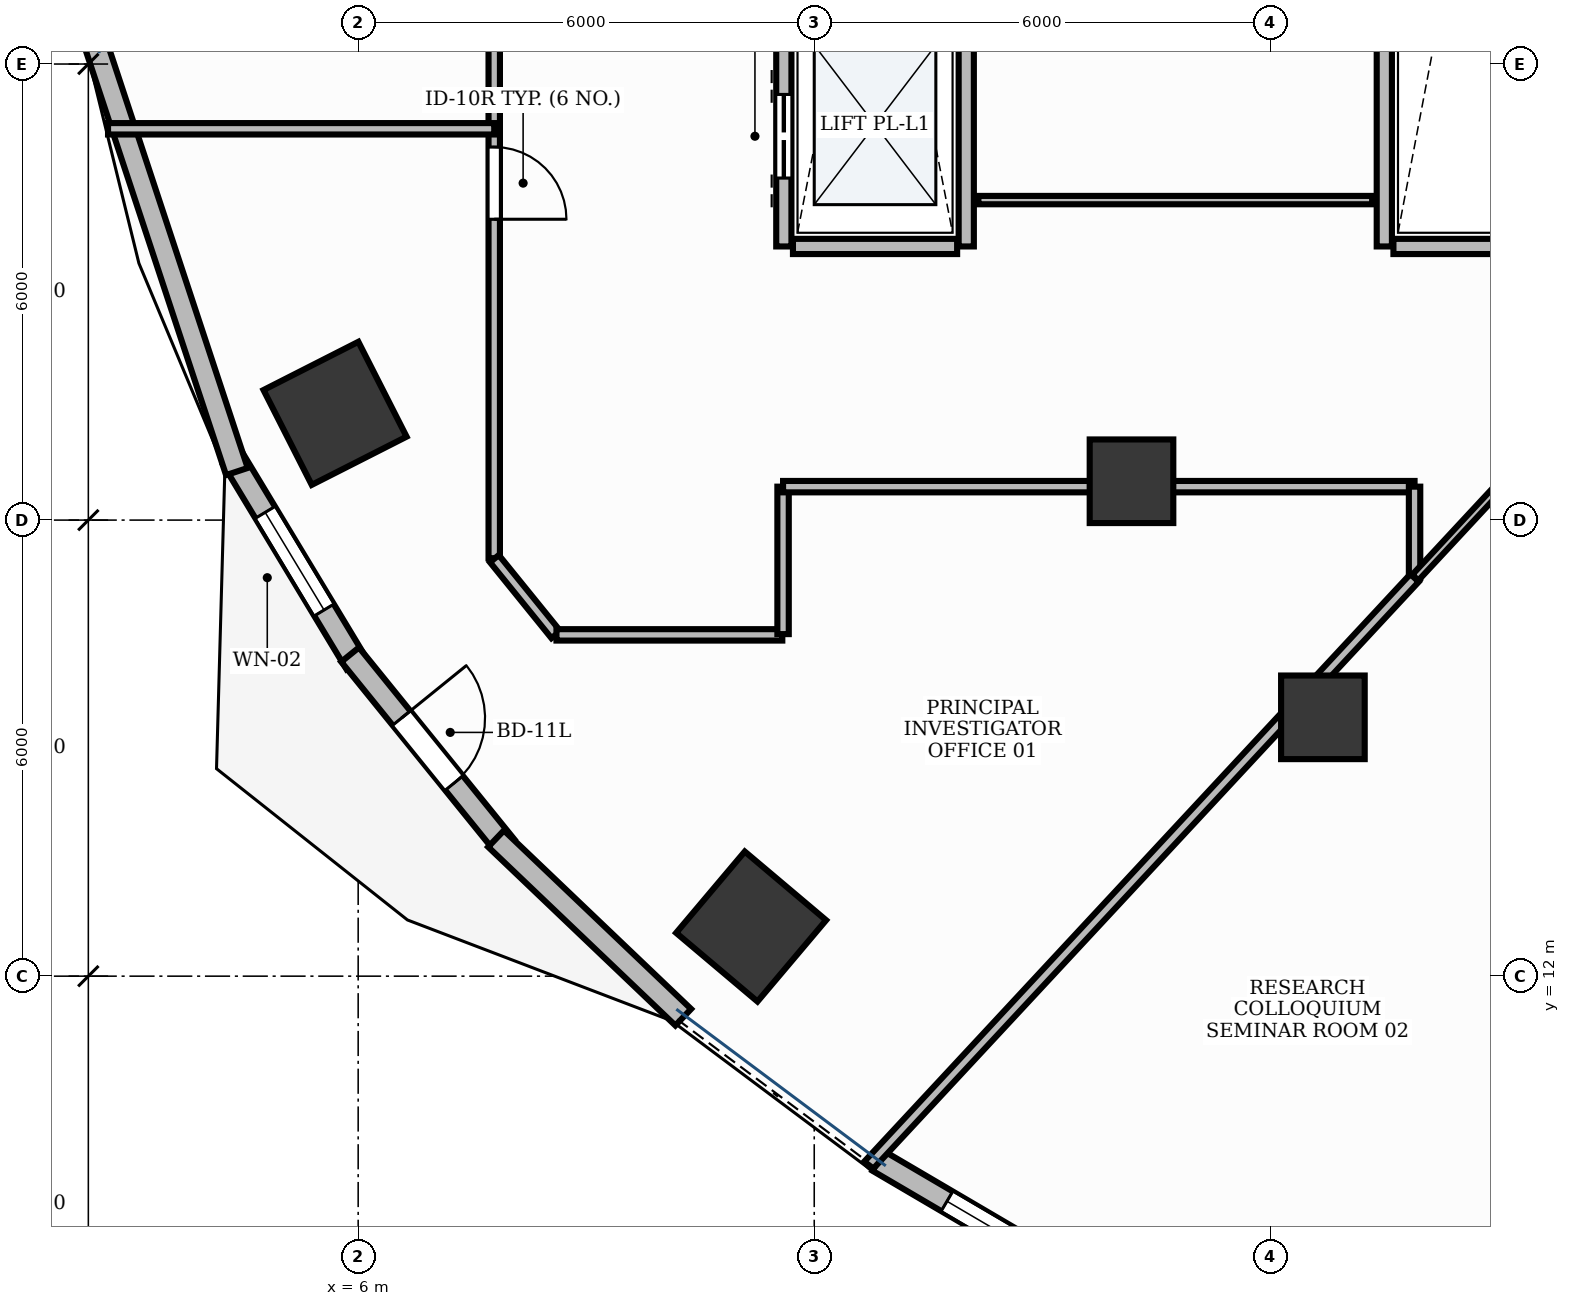
"""IFC4 building model, lengths in metres.
Left out: names, types, materials, properties, quantities, classifications, styles, units other than length and angle.
Written with IfcOpenShell. Run it as: python <this file> out.ifc"""

import sys

from ifc_helpers import new_model, si_unit, direction, frame, frame_2d, origin, origin_2d, place, context, subcontext, project, spatial, rectangle, extrude, element, fill, save


model = new_model("IFC4")
c1 = context("Model", 3, precision=1e-05, world=origin(), true_north=direction((0.0, 1.0)))
c2 = subcontext(c1, "Body", "Model", "MODEL_VIEW")
j1 = project(units=[si_unit("LENGTHUNIT", "METRE"), si_unit("PLANEANGLEUNIT", "RADIAN")], contexts=[c1])
p1 = place(None, origin())
s1 = spatial("IfcSite", under=j1, at=p1, CompositionType="ELEMENT")
p2 = place(p1, origin())
s2 = spatial("IfcBuilding", under=s1, at=p2, CompositionType="ELEMENT")
p3 = place(p2, frame((0.0, 0.0, 80.4)))
s3 = spatial("IfcBuildingStorey", under=s2, at=p3, CompositionType="ELEMENT", Elevation=80.4)
p4 = place(p3, frame((5.696, 19.404, -0.0), z_axis=(0.0, 0.0, 1.0), x_axis=(-0.453057191132, 0.891481453292, 0.0)))
e1 = element("IfcColumn", 1, at=p4, inside=s3, PredefinedType="COLUMN", context=c2, shape_type="SweptSolid", body=[
    extrude(rectangle(XDim=1.4, YDim=1.4, at=origin_2d()), origin(), (0.0, 0.0, 1.0), 3.881),
])
p5 = place(p3, frame((16.174, 18.511, -0.0), z_axis=(0.0, 0.0, 1.0), x_axis=(1.0, 0.0, 0.0)))
e2 = element("IfcColumn", 2, at=p5, inside=s3, PredefinedType="COLUMN", context=c2, shape_type="SweptSolid", body=[
    extrude(rectangle(XDim=1.1, YDim=1.1, at=origin_2d()), origin(), (0.0, 0.0, 1.0), 3.881),
])
p6 = place(p3, frame((11.17, 12.653, -0.0), z_axis=(0.0, 0.0, 1.0), x_axis=(-0.764246456939, 0.644924300253, 0.0)))
e3 = element("IfcColumn", 3, at=p6, inside=s3, PredefinedType="COLUMN", context=c2, shape_type="SweptSolid", body=[
    extrude(rectangle(XDim=1.4, YDim=1.4, at=origin_2d()), origin(), (0.0, 0.0, 1.0), 3.881),
])
p7 = place(p3, frame((18.692, 15.405, -0.0), z_axis=(0.0, 0.0, 1.0), x_axis=(1.0, 0.0, 0.0)))
e4 = element("IfcColumn", 4, at=p7, inside=s3, PredefinedType="COLUMN", context=c2, shape_type="SweptSolid", body=[
    extrude(rectangle(XDim=1.1, YDim=1.1, at=origin_2d()), origin(), (0.0, 0.0, 1.0), 3.881),
])
p8 = place(p3, frame((4.352, 18.805, 0.0), z_axis=(0.0, 0.0, 1.0), x_axis=(0.516447962267, -0.856318575222, 0.0)))
e5 = element("IfcWall", 5, at=p8, inside=s3, PredefinedType="STANDARD", context=c2, shape_type="SweptSolid", body=[
    extrude(rectangle(XDim=3.143, YDim=0.3, at=frame_2d((1.571, 0.0))), origin(), (0.0, 0.0, 1.0), 3.88),
])
p9 = place(p8, frame((0.821, 0.0, 0.95)))
e6 = element("IfcOpeningElement", 6, at=p9, cuts=e5, PredefinedType="OPENING", context=c2, shape_type="SweptSolid", body=[
    extrude(rectangle(XDim=1.5, YDim=1.8, at=frame_2d((0.75, 0.9))), frame((0.0, 0.165, 0.0), z_axis=(0.0, -1.0, 0.0), x_axis=(1.0, 0.0, 0.0)), (0.0, 0.0, 1.0), 0.33),
])
p10 = place(p3, frame((5.894, 16.23, 0.0), z_axis=(0.0, 0.0, 1.0), x_axis=(0.629295540187, -0.777166084631, 0.0)))
e7 = element("IfcWall", 7, at=p10, inside=s3, PredefinedType="STANDARD", context=c2, shape_type="SweptSolid", body=[
    extrude(rectangle(XDim=3.248, YDim=0.3, at=frame_2d((1.624, 0.0))), origin(), (0.0, 0.0, 1.0), 3.88),
])
p11 = place(p10, frame((1.074, 0.0, 0.0)))
e8 = element("IfcOpeningElement", 8, at=p11, cuts=e7, PredefinedType="OPENING", context=c2, shape_type="SweptSolid", body=[
    extrude(rectangle(XDim=1.1, YDim=2.15, at=frame_2d((0.55, 1.075))), frame((0.0, 0.165, 0.0), z_axis=(0.0, -1.0, 0.0), x_axis=(1.0, 0.0, 0.0)), (0.0, 0.0, 1.0), 0.33),
])
p12 = place(p3, frame((12.843, 9.569, 0.0), z_axis=(0.0, 0.0, 1.0), x_axis=(0.862473134325, -0.506102847817, 0.0)))
e9 = element("IfcWall", 9, at=p12, inside=s3, PredefinedType="STANDARD", context=c2, shape_type="SweptSolid", body=[
    extrude(rectangle(XDim=3.595, YDim=0.3, at=frame_2d((1.798, 0.0))), origin(), (0.0, 0.0, 1.0), 3.88),
])
p13 = place(p12, frame((1.048, 0.0, 0.95)))
e10 = element("IfcOpeningElement", 10, at=p13, cuts=e9, PredefinedType="OPENING", context=c2, shape_type="SweptSolid", body=[
    extrude(rectangle(XDim=1.5, YDim=1.8, at=frame_2d((0.75, 0.9))), frame((0.0, 0.165, 0.0), z_axis=(0.0, -1.0, 0.0), x_axis=(1.0, 0.0, 0.0)), (0.0, 0.0, 1.0), 0.33),
])
p14 = place(p3, frame((2.537, 24.289, 0.0), z_axis=(0.0, 0.0, 1.0), x_axis=(0.31372816724, -0.949512841978, 0.0)))
e11 = element("IfcWall", 11, at=p14, inside=s3, PredefinedType="STANDARD", context=c2, shape_type="SweptSolid", body=[
    extrude(rectangle(XDim=5.951, YDim=0.3, at=frame_2d((2.976, 0.0))), origin(), (0.0, 0.0, 1.0), 3.88),
])
p15 = place(p3, frame((7.814, 13.808, 0.0), z_axis=(0.0, 0.0, 1.0), x_axis=(0.72369587847, -0.69011902994, 0.0)))
e12 = element("IfcWall", 12, at=p15, inside=s3, PredefinedType="STANDARD", context=c2, shape_type="SweptSolid", body=[
    extrude(rectangle(XDim=3.403, YDim=0.3, at=frame_2d((1.701, 0.0))), origin(), (0.0, 0.0, 1.0), 3.88),
])
p16 = place(p3, frame((11.6, 21.6, 0.0), z_axis=(0.0, 0.0, 1.0), x_axis=(0.0, 1.0, 0.0)))
e13 = element("IfcWall", 13, at=p16, inside=s3, PredefinedType="PARTITIONING", context=c2, shape_type="SweptSolid", body=[
    extrude(rectangle(XDim=10.8, YDim=0.2, at=frame_2d((5.4, 0.0))), origin(), (0.0, 0.0, 1.0), 2.22),
])
p17 = place(p16, frame((0.9, 0.0, 0.0)))
e14 = element("IfcOpeningElement", 14, at=p17, cuts=e13, PredefinedType="OPENING", context=c2, shape_type="SweptSolid", body=[
    extrude(rectangle(XDim=1.1, YDim=2.2, at=frame_2d((0.55, 1.1))), frame((0.0, 0.115, 0.0), z_axis=(0.0, -1.0, 0.0), x_axis=(1.0, 0.0, 0.0)), (0.0, 0.0, 1.0), 0.23),
])
p18 = place(p16, frame((3.6, 0.0, 0.0)))
e15 = element("IfcOpeningElement", 15, at=p18, cuts=e13, PredefinedType="OPENING", context=c2, shape_type="SweptSolid", body=[
    extrude(rectangle(XDim=1.1, YDim=2.2, at=frame_2d((0.55, 1.1))), frame((0.0, 0.115, 0.0), z_axis=(0.0, -1.0, 0.0), x_axis=(1.0, 0.0, 0.0)), (0.0, 0.0, 1.0), 0.23),
])
p19 = place(p16, frame((6.3, 0.0, 0.0)))
e16 = element("IfcOpeningElement", 16, at=p19, cuts=e13, PredefinedType="OPENING", context=c2, shape_type="SweptSolid", body=[
    extrude(rectangle(XDim=1.1, YDim=2.2, at=frame_2d((0.55, 1.1))), frame((0.0, 0.115, 0.0), z_axis=(0.0, -1.0, 0.0), x_axis=(1.0, 0.0, 0.0)), (0.0, 0.0, 1.0), 0.23),
])
p20 = place(p16, frame((9.0, 0.0, 0.0)))
e17 = element("IfcOpeningElement", 17, at=p20, cuts=e13, PredefinedType="OPENING", context=c2, shape_type="SweptSolid", body=[
    extrude(rectangle(XDim=1.1, YDim=2.2, at=frame_2d((0.55, 1.1))), frame((0.0, 0.115, 0.0), z_axis=(0.0, -1.0, 0.0), x_axis=(1.0, 0.0, 0.0)), (0.0, 0.0, 1.0), 0.23),
])
p21 = place(p3, frame((14.0, 21.6, 0.0), z_axis=(0.0, 0.0, 1.0), x_axis=(0.0, 1.0, 0.0)))
e18 = element("IfcWall", 18, at=p21, inside=s3, PredefinedType="PARTITIONING", context=c2, shape_type="SweptSolid", body=[
    extrude(rectangle(XDim=10.8, YDim=0.2, at=frame_2d((5.4, 0.0))), origin(), (0.0, 0.0, 1.0), 2.22),
])
p22 = place(p3, frame((11.72, 21.6, 0.0), z_axis=(0.0, 0.0, 1.0), x_axis=(1.0, 0.0, 0.0)))
e19 = element("IfcWall", 19, at=p22, inside=s3, PredefinedType="PARTITIONING", context=c2, shape_type="SweptSolid", body=[
    extrude(rectangle(XDim=2.16, YDim=0.2, at=frame_2d((1.08, 0.0))), origin(), (0.0, 0.0, 1.0), 2.22),
])
p23 = place(p3, frame((19.5, 21.6, 0.0), z_axis=(0.0, 0.0, 1.0), x_axis=(0.0, 1.0, 0.0)))
e20 = element("IfcWall", 20, at=p23, inside=s3, PredefinedType="PARTITIONING", context=c2, shape_type="SweptSolid", body=[
    extrude(rectangle(XDim=10.8, YDim=0.2, at=frame_2d((5.4, 0.0))), origin(), (0.0, 0.0, 1.0), 2.22),
])
p24 = place(p3, frame((19.62, 21.6, 0.0), z_axis=(0.0, 0.0, 1.0), x_axis=(1.0, 0.0, 0.0)))
e21 = element("IfcWall", 21, at=p24, inside=s3, PredefinedType="PARTITIONING", context=c2, shape_type="SweptSolid", body=[
    extrude(rectangle(XDim=2.11, YDim=0.2, at=frame_2d((1.055, 0.0))), origin(), (0.0, 0.0, 1.0), 2.22),
])
p25 = place(p3, frame((7.79, 23.148, 0.0), z_axis=(0.0, 0.0, 1.0), x_axis=(0.0, -1.0, 0.0)))
e22 = element("IfcWall", 22, at=p25, inside=s3, PredefinedType="PARTITIONING", context=c2, shape_type="SweptSolid", body=[
    extrude(rectangle(XDim=5.649, YDim=0.15, at=frame_2d((2.825, 0.0))), origin(), (0.0, 0.0, 1.0), 2.22),
])
p26 = place(p25, frame((0.24, 0.0, 0.0)))
e23 = element("IfcOpeningElement", 23, at=p26, cuts=e22, PredefinedType="OPENING", context=c2, shape_type="SweptSolid", body=[
    extrude(rectangle(XDim=0.95, YDim=2.15, at=frame_2d((0.475, 1.075))), frame((0.0, 0.09, 0.0), z_axis=(0.0, -1.0, 0.0), x_axis=(1.0, 0.0, 0.0)), (0.0, 0.0, 1.0), 0.18),
])
p27 = place(p3, frame((7.79, 36.501, 0.0), z_axis=(0.0, 0.0, 1.0), x_axis=(0.0, -1.0, 0.0)))
e24 = element("IfcWall", 24, at=p27, inside=s3, PredefinedType="PARTITIONING", context=c2, shape_type="SweptSolid", body=[
    extrude(rectangle(XDim=13.343, YDim=0.15, at=frame_2d((6.672, 0.0))), origin(), (0.0, 0.0, 1.0), 2.22),
])
p28 = place(p27, frame((5.079, 0.0, 0.0)))
e25 = element("IfcOpeningElement", 25, at=p28, cuts=e24, PredefinedType="OPENING", context=c2, shape_type="SweptSolid", body=[
    extrude(rectangle(XDim=0.95, YDim=2.15, at=frame_2d((0.475, 1.075))), frame((0.0, 0.09, 0.0), z_axis=(0.0, -1.0, 0.0), x_axis=(1.0, 0.0, 0.0)), (0.0, 0.0, 1.0), 0.18),
])
p29 = place(p3, frame((2.709, 23.148, 0.0), z_axis=(0.0, 0.0, 1.0), x_axis=(1.0, 0.0, 0.0)))
e26 = element("IfcWall", 26, at=p29, inside=s3, PredefinedType="PARTITIONING", context=c2, shape_type="SweptSolid", body=[
    extrude(rectangle(XDim=5.081, YDim=0.15, at=frame_2d((2.541, 0.0))), origin(), (0.0, 0.0, 1.0), 2.22),
])
p30 = place(p3, frame((7.792, 17.492, 0.0), z_axis=(0.0, 0.0, 1.0), x_axis=(0.629225554682, -0.777222748854, 0.0)))
e27 = element("IfcWall", 27, at=p30, inside=s3, PredefinedType="PARTITIONING", context=c2, shape_type="SweptSolid", body=[
    extrude(rectangle(XDim=1.285, YDim=0.15, at=frame_2d((0.643, 0.0))), origin(), (0.0, 0.0, 1.0), 2.22),
])
p31 = place(p3, frame((8.609, 16.49, 0.0), z_axis=(0.0, 0.0, 1.0), x_axis=(1.0, 0.0, 0.0)))
e28 = element("IfcWall", 28, at=p31, inside=s3, PredefinedType="PARTITIONING", context=c2, shape_type="SweptSolid", body=[
    extrude(rectangle(XDim=2.971, YDim=0.15, at=frame_2d((1.486, 0.0))), origin(), (0.0, 0.0, 1.0), 2.22),
])
p32 = place(p3, frame((11.59, 16.5, 0.0), z_axis=(0.0, 0.0, 1.0), x_axis=(0.0, 1.0, 0.0)))
e29 = element("IfcWall", 29, at=p32, inside=s3, PredefinedType="PARTITIONING", context=c2, shape_type="SweptSolid", body=[
    extrude(rectangle(XDim=1.94, YDim=0.15, at=frame_2d((0.97, 0.0))), origin(), (0.0, 0.0, 1.0), 2.22),
])
p33 = place(p3, frame((11.59, 18.44, 0.0), z_axis=(0.0, 0.0, 1.0), x_axis=(1.0, 0.0, 0.0)))
e30 = element("IfcWall", 30, at=p33, inside=s3, PredefinedType="PARTITIONING", context=c2, shape_type="SweptSolid", body=[
    extrude(rectangle(XDim=8.308, YDim=0.15, at=frame_2d((4.154, 0.0))), origin(), (0.0, 0.0, 1.0), 2.22),
])
p34 = place(p3, frame((19.898, 18.44, 0.0), z_axis=(0.0, 0.0, 1.0), x_axis=(0.0, -1.0, 0.0)))
e31 = element("IfcWall", 31, at=p34, inside=s3, PredefinedType="PARTITIONING", context=c2, shape_type="SweptSolid", body=[
    extrude(rectangle(XDim=1.201, YDim=0.15, at=frame_2d((0.6, 0.0))), origin(), (0.0, 0.0, 1.0), 2.22),
])
p35 = place(p3, frame((19.898, 17.239, 0.0), z_axis=(0.0, 0.0, 1.0), x_axis=(-0.680819073157, -0.732451629547, 0.0)))
e32 = element("IfcWall", 32, at=p35, inside=s3, PredefinedType="PARTITIONING", context=c2, shape_type="SweptSolid", body=[
    extrude(rectangle(XDim=10.559, YDim=0.15, at=frame_2d((5.279, 0.0))), origin(), (0.0, 0.0, 1.0), 2.22),
])
p36 = place(p3, frame((25.597, 18.44, 0.0), z_axis=(0.0, 0.0, 1.0), x_axis=(-0.366756051999, -0.930317149322, 0.0)))
e33 = element("IfcWall", 33, at=p36, inside=s3, PredefinedType="MOVABLE", context=c2, shape_type="SweptSolid", body=[
    extrude(rectangle(XDim=13.719, YDim=0.11, at=frame_2d((6.859, 0.0))), origin(), (0.0, 0.0, 1.0), 2.22),
])
p37 = place(p3, frame((19.908, 17.244, 0.0), z_axis=(0.0, 0.0, 1.0), x_axis=(0.680846676947, 0.732425970655, 0.0)))
e34 = element("IfcWall", 34, at=p37, inside=s3, PredefinedType="MOVABLE", context=c2, shape_type="SweptSolid", body=[
    extrude(rectangle(XDim=1.633, YDim=0.11, at=frame_2d((0.816, 0.0))), origin(), (0.0, 0.0, 1.0), 2.22),
])
p38 = place(p3, frame((19.34, 22.21, 0.0), z_axis=(0.0, 0.0, 1.0), x_axis=(-1.0, 0.0, 0.0)))
e35 = element("IfcWall", 35, at=p38, inside=s3, PredefinedType="MOVABLE", context=c2, shape_type="SweptSolid", body=[
    extrude(rectangle(XDim=5.18, YDim=0.11, at=frame_2d((2.59, 0.0))), origin(), (0.0, 0.0, 1.0), 2.22),
])
p39 = place(p9, origin())
e36 = element("IfcWindow", 36, at=p39, inside=s3, PartitioningType="DOUBLE_PANEL_VERTICAL", PredefinedType="WINDOW", context=c2, shape_type="SweptSolid", body=[
    extrude(rectangle(XDim=1.5, YDim=1.8, at=frame_2d((0.75, 0.9))), frame((0.0, 0.03, 0.0), z_axis=(0.0, -1.0, 0.0), x_axis=(1.0, 0.0, 0.0)), (0.0, 0.0, 1.0), 0.06),
])
fill(e6, e36)
p40 = place(p11, origin())
e37 = element("IfcDoor", 37, at=p40, inside=s3, OperationType="SINGLE_SWING_LEFT", PredefinedType="DOOR", context=c2, shape_type="SweptSolid", body=[
    extrude(rectangle(XDim=1.1, YDim=2.15, at=frame_2d((0.55, 1.075))), frame((0.0, 0.025, 0.0), z_axis=(0.0, -1.0, 0.0), x_axis=(1.0, 0.0, 0.0)), (0.0, 0.0, 1.0), 0.05),
])
fill(e8, e37)
p41 = place(p13, origin())
e38 = element("IfcWindow", 38, at=p41, inside=s3, PartitioningType="DOUBLE_PANEL_VERTICAL", PredefinedType="WINDOW", context=c2, shape_type="SweptSolid", body=[
    extrude(rectangle(XDim=1.5, YDim=1.8, at=frame_2d((0.75, 0.9))), frame((0.0, 0.03, 0.0), z_axis=(0.0, -1.0, 0.0), x_axis=(1.0, 0.0, 0.0)), (0.0, 0.0, 1.0), 0.06),
])
fill(e10, e38)
p42 = place(p17, origin())
e39 = element("IfcDoor", 39, at=p42, inside=s3, OperationType="DOUBLE_DOOR_SLIDING", PredefinedType="DOOR", context=c2, shape_type="SweptSolid", body=[
    extrude(rectangle(XDim=1.1, YDim=2.2, at=frame_2d((0.55, 1.1))), frame((0.0, 0.025, 0.0), z_axis=(0.0, -1.0, 0.0), x_axis=(1.0, 0.0, 0.0)), (0.0, 0.0, 1.0), 0.05),
])
fill(e14, e39)
p43 = place(p26, origin())
e40 = element("IfcDoor", 40, at=p43, inside=s3, OperationType="SINGLE_SWING_RIGHT", PredefinedType="DOOR", context=c2, shape_type="SweptSolid", body=[
    extrude(rectangle(XDim=0.95, YDim=2.15, at=frame_2d((0.475, 1.075))), frame((0.0, 0.025, 0.0), z_axis=(0.0, -1.0, 0.0), x_axis=(1.0, 0.0, 0.0)), (0.0, 0.0, 1.0), 0.05),
])
fill(e23, e40)
save(model, sys.argv[1])
